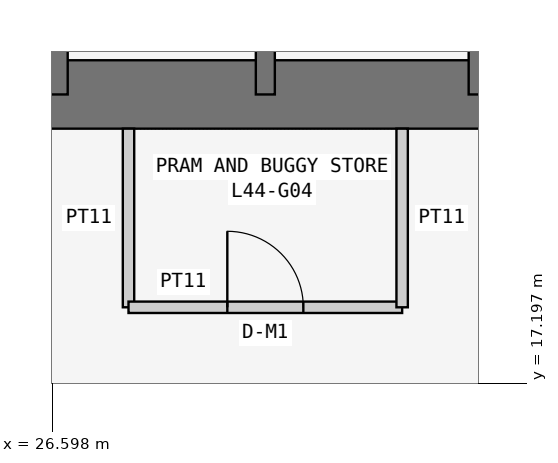
"""IFC4 building model, lengths in metres.
Left out: names, types, materials, properties, quantities, classifications, styles, units other than length and angle.
Written with IfcOpenShell. Run it as: python <this file> out.ifc"""

import sys

from ifc_helpers import new_model, si_unit, direction, frame, frame_2d, origin, place, context, subcontext, project, spatial, rectangle, extrude, element, fill, save


model = new_model("IFC4")
c1 = context("Model", 3, precision=1e-05, world=origin(), true_north=direction((0.0, 1.0)))
c2 = subcontext(c1, "Body", "Model", "MODEL_VIEW")
j1 = project(units=[si_unit("LENGTHUNIT", "METRE"), si_unit("PLANEANGLEUNIT", "RADIAN")], contexts=[c1])
p1 = place(None, origin())
s1 = spatial("IfcSite", under=j1, at=p1, CompositionType="ELEMENT")
p2 = place(p1, origin())
s2 = spatial("IfcBuilding", under=s1, at=p2, CompositionType="ELEMENT")
p3 = place(p2, frame((0.0, 0.0, 170.1)))
s3 = spatial("IfcBuildingStorey", under=s2, at=p3, CompositionType="ELEMENT", Elevation=170.1)
p4 = place(p3, frame((21.0, 21.0, 0.0), z_axis=(0.0, 0.0, 1.0), x_axis=(1.0, 0.0, 0.0)))
e1 = element("IfcWall", 1, at=p4, inside=s3, PredefinedType="SHEAR", context=c2, shape_type="SweptSolid", body=[
    extrude(rectangle(XDim=17.25, YDim=0.9, at=frame_2d((8.625, 0.0))), origin(), (0.0, 0.0, 1.0), 3.6),
])
p5 = place(p3, frame((26.6, 21.0, 0.0), z_axis=(0.0, 0.0, 1.0), x_axis=(0.0, 1.0, 0.0)))
e2 = element("IfcWall", 2, at=p5, inside=s3, PredefinedType="SHEAR", context=c2, shape_type="SweptSolid", body=[
    extrude(rectangle(XDim=16.8, YDim=0.4, at=frame_2d((8.4, 0.0))), origin(), (0.0, 0.0, 1.0), 3.6),
])
p6 = place(p5, frame((10.4, 0.0, 0.0)))
e3 = element("IfcOpeningElement", 3, at=p6, cuts=e2, PredefinedType="OPENING", context=c2, shape_type="SweptSolid", body=[
    extrude(rectangle(XDim=1.2, YDim=2.1, at=frame_2d((0.6, 1.05))), frame((0.0, 0.21, 0.0), z_axis=(0.0, -1.0, 0.0), x_axis=(1.0, 0.0, 0.0)), (0.0, 0.0, 1.0), 0.42),
])
for number, where, z_axis, x_axis in (
    (4, (29.4, 21.0, 0.0), (0.0, 0.0, 1.0), (0.0, 1.0, 0.0)),
    (5, (32.2, 21.0, 0.0), (0.0, 0.0, 1.0), (0.0, 1.0, 0.0)),
):
    element("IfcWall", number, at=place(p3, frame(where, z_axis=z_axis, x_axis=x_axis)), inside=s3, PredefinedType="SHEAR", context=c2, shape_type="SweptSolid", body=[
        extrude(rectangle(XDim=3.2, YDim=0.25, at=frame_2d((1.6, 0.0))), origin(), (0.0, 0.0, 1.0), 3.6),
    ])
p7 = place(p3, frame((27.6, 20.55, 0.0), z_axis=(0.0, 0.0, 1.0), x_axis=(0.0, -1.0, 0.0)))
e6 = element("IfcWall", 6, at=p7, inside=s3, PredefinedType="PARTITIONING", context=c2, shape_type="SweptSolid", body=[
    extrude(rectangle(XDim=2.35, YDim=0.15, at=frame_2d((1.175, 0.0))), origin(), (0.0, 0.0, 1.0), 3.45),
])
p8 = place(p3, frame((27.6, 18.2, 0.0), z_axis=(0.0, 0.0, 1.0), x_axis=(1.0, 0.0, 0.0)))
e7 = element("IfcWall", 7, at=p8, inside=s3, PredefinedType="PARTITIONING", context=c2, shape_type="SweptSolid", body=[
    extrude(rectangle(XDim=3.6, YDim=0.15, at=frame_2d((1.8, 0.0))), origin(), (0.0, 0.0, 1.0), 3.45),
])
p9 = place(p8, frame((1.3, 0.0, 0.0)))
e8 = element("IfcOpeningElement", 8, at=p9, cuts=e7, PredefinedType="OPENING", context=c2, shape_type="SweptSolid", body=[
    extrude(rectangle(XDim=1.0, YDim=2.1, at=frame_2d((0.5, 1.05))), frame((0.0, 0.085, 0.0), z_axis=(0.0, -1.0, 0.0), x_axis=(1.0, 0.0, 0.0)), (0.0, 0.0, 1.0), 0.17),
])
p10 = place(p3, frame((31.2, 18.2, 0.0), z_axis=(0.0, 0.0, 1.0), x_axis=(0.0, 1.0, 0.0)))
e9 = element("IfcWall", 9, at=p10, inside=s3, PredefinedType="PARTITIONING", context=c2, shape_type="SweptSolid", body=[
    extrude(rectangle(XDim=2.35, YDim=0.15, at=frame_2d((1.175, 0.0))), origin(), (0.0, 0.0, 1.0), 3.45),
])
p11 = place(p9, origin())
e10 = element("IfcDoor", 10, at=p11, inside=s3, OperationType="SINGLE_SWING_LEFT", PredefinedType="DOOR", context=c2, shape_type="SweptSolid", body=[
    extrude(rectangle(XDim=1.0, YDim=2.1, at=frame_2d((0.5, 1.05))), frame((0.0, 0.025, 0.0), z_axis=(0.0, -1.0, 0.0), x_axis=(1.0, 0.0, 0.0)), (0.0, 0.0, 1.0), 0.05),
])
fill(e8, e10)
save(model, sys.argv[1])
